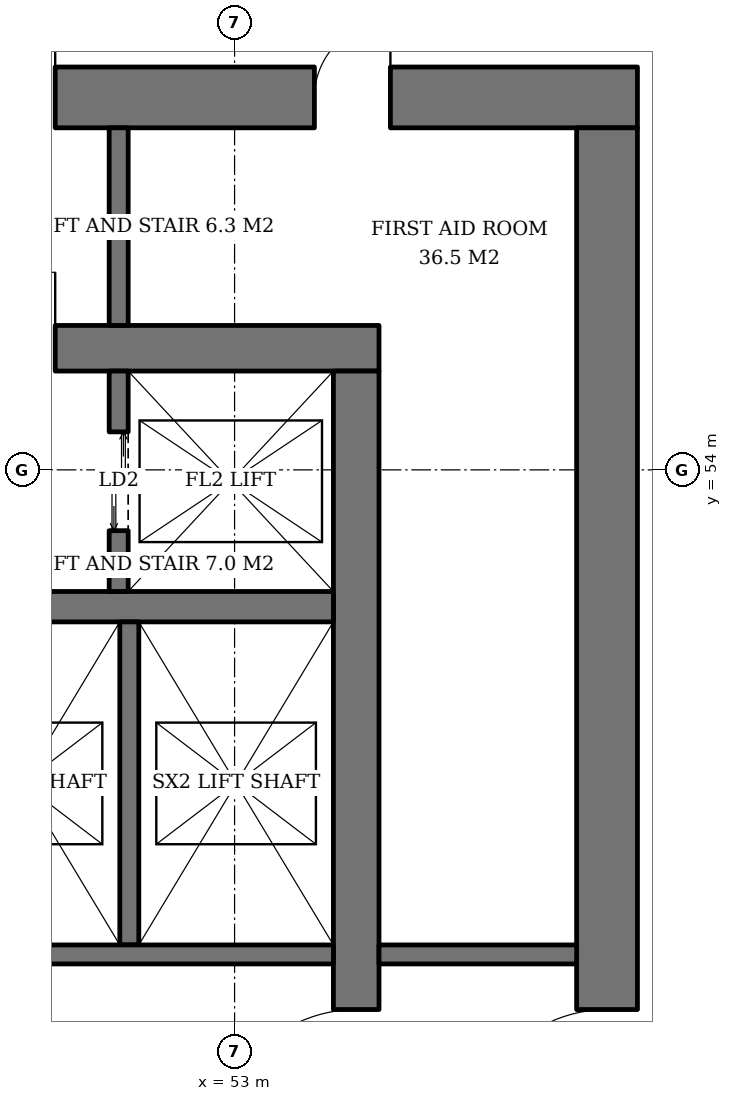
"""IFC4 building model, lengths in metres.
Left out: names, types, materials, properties, quantities, classifications, styles, units other than length and angle.
Written with IfcOpenShell. Run it as: python <this file> out.ifc"""

import sys

from ifc_helpers import new_model, si_unit, direction, frame, frame_2d, origin, place, context, subcontext, project, spatial, rectangle, extrude, element, fill, save


model = new_model("IFC4")
c1 = context("Model", 3, precision=1e-05, world=origin(), true_north=direction((0.0, 1.0)))
c2 = subcontext(c1, "Body", "Model", "MODEL_VIEW")
j1 = project(units=[si_unit("LENGTHUNIT", "METRE"), si_unit("PLANEANGLEUNIT", "RADIAN")], contexts=[c1])
p1 = place(None, origin())
s1 = spatial("IfcSite", under=j1, at=p1, CompositionType="ELEMENT")
p2 = place(p1, origin())
s2 = spatial("IfcBuilding", under=s1, at=p2, CompositionType="ELEMENT")
p3 = place(p2, frame((0.0, 0.0, 40.0)))
s3 = spatial("IfcBuildingStorey", under=s2, at=p3, CompositionType="ELEMENT", Elevation=40.0)
p4 = place(p3, frame((35.1, 55.6, 0.0), z_axis=(0.0, 0.0, 1.0), x_axis=(1.0, 0.0, 0.0)))
e1 = element("IfcWall", 1, at=p4, inside=s3, PredefinedType="SHEAR", context=c2, shape_type="SweptSolid", body=[
    extrude(rectangle(XDim=19.8, YDim=0.6, at=frame_2d((9.9, 0.0))), origin(), (0.0, 0.0, 1.0), 3.8),
])
p5 = place(p4, frame((14.54, 0.0, 0.0)))
e2 = element("IfcOpeningElement", 2, at=p5, cuts=e1, PredefinedType="OPENING", context=c2, shape_type="SweptSolid", body=[
    extrude(rectangle(XDim=1.0, YDim=2.1, at=frame_2d((0.5, 1.05))), frame((0.0, 0.31, 0.0), z_axis=(0.0, -1.0, 0.0), x_axis=(1.0, 0.0, 0.0)), (0.0, 0.0, 1.0), 0.62),
])
p6 = place(p4, frame((2.425, 0.0, 0.0)))
e3 = element("IfcOpeningElement", 3, at=p6, cuts=e1, PredefinedType="OPENING", context=c2, shape_type="SweptSolid", body=[
    extrude(rectangle(XDim=1.0, YDim=2.1, at=frame_2d((0.5, 1.05))), frame((0.0, 0.31, 0.0), z_axis=(0.0, -1.0, 0.0), x_axis=(1.0, 0.0, 0.0)), (0.0, 0.0, 1.0), 0.62),
])
p7 = place(p3, frame((54.6, 36.7, 0.0), z_axis=(0.0, 0.0, 1.0), x_axis=(0.0, 1.0, 0.0)))
e4 = element("IfcWall", 4, at=p7, inside=s3, PredefinedType="SHEAR", context=c2, shape_type="SweptSolid", body=[
    extrude(rectangle(XDim=18.6, YDim=0.6, at=frame_2d((9.3, 0.0))), origin(), (0.0, 0.0, 1.0), 3.8),
])
p8 = place(p7, frame((8.4, 0.0, 0.0)))
e5 = element("IfcOpeningElement", 5, at=p8, cuts=e4, PredefinedType="OPENING", context=c2, shape_type="SweptSolid", body=[
    extrude(rectangle(XDim=1.8, YDim=2.4, at=frame_2d((0.9, 1.2))), frame((0.0, 0.31, 0.0), z_axis=(0.0, -1.0, 0.0), x_axis=(1.0, 0.0, 0.0)), (0.0, 0.0, 1.0), 0.62),
])
p9 = place(p3, frame((31.7, 58.9, 0.0), z_axis=(0.0, 0.0, 1.0), x_axis=(1.0, 0.0, 0.0)))
e6 = element("IfcWall", 6, at=p9, inside=s3, PredefinedType="SHEAR", context=c2, shape_type="SweptSolid", body=[
    extrude(rectangle(XDim=26.6, YDim=0.8, at=frame_2d((13.3, 0.0))), origin(), (0.0, 0.0, 1.0), 3.8),
])
p10 = place(p9, frame((17.94, 0.0, 0.0)))
e7 = element("IfcOpeningElement", 7, at=p10, cuts=e6, PredefinedType="OPENING", context=c2, shape_type="SweptSolid", body=[
    extrude(rectangle(XDim=1.0, YDim=2.1, at=frame_2d((0.5, 1.05))), frame((0.0, 0.41, 0.0), z_axis=(0.0, -1.0, 0.0), x_axis=(1.0, 0.0, 0.0)), (0.0, 0.0, 1.0), 0.82),
])
p11 = place(p9, frame((5.825, 0.0, 0.0)))
e8 = element("IfcOpeningElement", 8, at=p11, cuts=e6, PredefinedType="OPENING", context=c2, shape_type="SweptSolid", body=[
    extrude(rectangle(XDim=1.0, YDim=2.1, at=frame_2d((0.5, 1.05))), frame((0.0, 0.41, 0.0), z_axis=(0.0, -1.0, 0.0), x_axis=(1.0, 0.0, 0.0)), (0.0, 0.0, 1.0), 0.82),
])
p12 = place(p9, frame((1.05, 0.0, 0.0)))
e9 = element("IfcOpeningElement", 9, at=p12, cuts=e6, PredefinedType="OPENING", context=c2, shape_type="SweptSolid", body=[
    extrude(rectangle(XDim=1.0, YDim=2.1, at=frame_2d((0.5, 1.05))), frame((0.0, 0.41, 0.0), z_axis=(0.0, -1.0, 0.0), x_axis=(1.0, 0.0, 0.0)), (0.0, 0.0, 1.0), 0.82),
])
p13 = place(p9, frame((2.637, 0.0, 0.0)))
e10 = element("IfcOpeningElement", 10, at=p13, cuts=e6, PredefinedType="OPENING", context=c2, shape_type="SweptSolid", body=[
    extrude(rectangle(XDim=1.0, YDim=2.1, at=frame_2d((0.5, 1.05))), frame((0.0, 0.41, 0.0), z_axis=(0.0, -1.0, 0.0), x_axis=(1.0, 0.0, 0.0)), (0.0, 0.0, 1.0), 0.82),
])
p14 = place(p9, frame((4.229, 0.0, 0.0)))
e11 = element("IfcOpeningElement", 11, at=p14, cuts=e6, PredefinedType="OPENING", context=c2, shape_type="SweptSolid", body=[
    extrude(rectangle(XDim=1.0, YDim=2.1, at=frame_2d((0.5, 1.05))), frame((0.0, 0.41, 0.0), z_axis=(0.0, -1.0, 0.0), x_axis=(1.0, 0.0, 0.0)), (0.0, 0.0, 1.0), 0.82),
])
p15 = place(p9, frame((9.126, 0.0, 0.0)))
e12 = element("IfcOpeningElement", 12, at=p15, cuts=e6, PredefinedType="OPENING", context=c2, shape_type="SweptSolid", body=[
    extrude(rectangle(XDim=1.0, YDim=2.1, at=frame_2d((0.5, 1.05))), frame((0.0, 0.41, 0.0), z_axis=(0.0, -1.0, 0.0), x_axis=(1.0, 0.0, 0.0)), (0.0, 0.0, 1.0), 0.82),
])
p16 = place(p9, frame((14.029, 0.0, 0.0)))
e13 = element("IfcOpeningElement", 13, at=p16, cuts=e6, PredefinedType="OPENING", context=c2, shape_type="SweptSolid", body=[
    extrude(rectangle(XDim=1.0, YDim=2.1, at=frame_2d((0.5, 1.05))), frame((0.0, 0.41, 0.0), z_axis=(0.0, -1.0, 0.0), x_axis=(1.0, 0.0, 0.0)), (0.0, 0.0, 1.0), 0.82),
])
p17 = place(p9, frame((22.35, 0.0, 0.0)))
e14 = element("IfcOpeningElement", 14, at=p17, cuts=e6, PredefinedType="OPENING", context=c2, shape_type="SweptSolid", body=[
    extrude(rectangle(XDim=1.0, YDim=2.1, at=frame_2d((0.5, 1.05))), frame((0.0, 0.41, 0.0), z_axis=(0.0, -1.0, 0.0), x_axis=(1.0, 0.0, 0.0)), (0.0, 0.0, 1.0), 0.82),
])
p18 = place(p3, frame((57.9, 33.5, 0.0), z_axis=(0.0, 0.0, 1.0), x_axis=(0.0, 1.0, 0.0)))
e15 = element("IfcWall", 15, at=p18, inside=s3, PredefinedType="SHEAR", context=c2, shape_type="SweptSolid", body=[
    extrude(rectangle(XDim=25.0, YDim=0.8, at=frame_2d((12.5, 0.0))), origin(), (0.0, 0.0, 1.0), 3.8),
])
p19 = place(p18, frame((11.6, 0.0, 0.0)))
e16 = element("IfcOpeningElement", 16, at=p19, cuts=e15, PredefinedType="OPENING", context=c2, shape_type="SweptSolid", body=[
    extrude(rectangle(XDim=1.8, YDim=2.4, at=frame_2d((0.9, 1.2))), frame((0.0, 0.41, 0.0), z_axis=(0.0, -1.0, 0.0), x_axis=(1.0, 0.0, 0.0)), (0.0, 0.0, 1.0), 0.82),
])
p20 = place(p3, frame((35.7, 52.2, 0.0), z_axis=(0.0, 0.0, 1.0), x_axis=(1.0, 0.0, 0.0)))
e17 = element("IfcWall", 17, at=p20, inside=s3, PredefinedType="SHEAR", context=c2, shape_type="SweptSolid", body=[
    extrude(rectangle(XDim=18.6, YDim=0.4, at=frame_2d((9.3, 0.0))), origin(), (0.0, 0.0, 1.0), 3.8),
])
p21 = place(p3, frame((51.475, 52.4, 0.0), z_axis=(0.0, 0.0, 1.0), x_axis=(0.0, 1.0, 0.0)))
e18 = element("IfcWall", 18, at=p21, inside=s3, PredefinedType="SHEAR", context=c2, shape_type="SweptSolid", body=[
    extrude(rectangle(XDim=2.9, YDim=0.25, at=frame_2d((1.45, 0.0))), origin(), (0.0, 0.0, 1.0), 3.8),
])
p22 = place(p21, frame((0.8, 0.0, 0.0)))
e19 = element("IfcOpeningElement", 19, at=p22, cuts=e18, PredefinedType="OPENING", context=c2, shape_type="SweptSolid", body=[
    extrude(rectangle(XDim=1.3, YDim=2.2, at=frame_2d((0.65, 1.1))), frame((0.0, 0.135, 0.0), z_axis=(0.0, -1.0, 0.0), x_axis=(1.0, 0.0, 0.0)), (0.0, 0.0, 1.0), 0.27),
])
p23 = place(p3, frame((51.615, 47.75, 0.0), z_axis=(0.0, 0.0, 1.0), x_axis=(0.0, 1.0, 0.0)))
e20 = element("IfcWall", 20, at=p23, inside=s3, PredefinedType="SHEAR", context=c2, shape_type="SweptSolid", body=[
    extrude(rectangle(XDim=4.25, YDim=0.25, at=frame_2d((2.125, 0.0))), origin(), (0.0, 0.0, 1.0), 3.8),
])
p24 = place(p3, frame((48.93, 47.625, 0.0), z_axis=(0.0, 0.0, 1.0), x_axis=(1.0, 0.0, 0.0)))
e21 = element("IfcWall", 21, at=p24, inside=s3, PredefinedType="SHEAR", context=c2, shape_type="SweptSolid", body=[
    extrude(rectangle(XDim=5.37, YDim=0.25, at=frame_2d((2.685, 0.0))), origin(), (0.0, 0.0, 1.0), 3.8),
])
for number, where, z_axis, x_axis in (
    (22, (51.475, 55.9, 0.0), (0.0, 0.0, 1.0), (0.0, 1.0, 0.0)),
    (23, (54.9, 47.625, 0.0), (0.0, 0.0, 1.0), (1.0, 0.0, 0.0)),
):
    element("IfcWall", number, at=place(p3, frame(where, z_axis=z_axis, x_axis=x_axis)), inside=s3, PredefinedType="SOLIDWALL", context=c2, shape_type="SweptSolid", body=[
        extrude(rectangle(XDim=2.6, YDim=0.25, at=frame_2d((1.3, 0.0))), origin(), (0.0, 0.0, 1.0), 3.62),
    ])
p25 = place(p22, origin())
e24 = element("IfcDoor", 24, at=p25, inside=s3, OperationType="DOUBLE_DOOR_SLIDING", PredefinedType="DOOR", context=c2, shape_type="SweptSolid", body=[
    extrude(rectangle(XDim=1.3, YDim=2.2, at=frame_2d((0.65, 1.1))), frame((0.0, 0.025, 0.0), z_axis=(0.0, -1.0, 0.0), x_axis=(1.0, 0.0, 0.0)), (0.0, 0.0, 1.0), 0.05),
])
fill(e19, e24)
p26 = place(p5, origin())
e25 = element("IfcDoor", 25, at=p26, inside=s3, OperationType="SINGLE_SWING_RIGHT", PredefinedType="DOOR", context=c2, shape_type="SweptSolid", body=[
    extrude(rectangle(XDim=1.0, YDim=2.1, at=frame_2d((0.5, 1.05))), frame((0.0, 0.025, 0.0), z_axis=(0.0, -1.0, 0.0), x_axis=(1.0, 0.0, 0.0)), (0.0, 0.0, 1.0), 0.05),
])
fill(e2, e25)
p27 = place(p8, origin())
e26 = element("IfcDoor", 26, at=p27, inside=s3, OperationType="DOUBLE_DOOR_SINGLE_SWING", PredefinedType="DOOR", context=c2, shape_type="SweptSolid", body=[
    extrude(rectangle(XDim=1.8, YDim=2.4, at=frame_2d((0.9, 1.2))), frame((0.0, 0.025, 0.0), z_axis=(0.0, -1.0, 0.0), x_axis=(1.0, 0.0, 0.0)), (0.0, 0.0, 1.0), 0.05),
])
fill(e5, e26)
p28 = place(p19, origin())
e27 = element("IfcDoor", 27, at=p28, inside=s3, OperationType="DOUBLE_DOOR_SINGLE_SWING", PredefinedType="DOOR", context=c2, shape_type="SweptSolid", body=[
    extrude(rectangle(XDim=1.8, YDim=2.4, at=frame_2d((0.9, 1.2))), frame((0.0, 0.025, 0.0), z_axis=(0.0, -1.0, 0.0), x_axis=(1.0, 0.0, 0.0)), (0.0, 0.0, 1.0), 0.05),
])
fill(e16, e27)
p29 = place(p10, origin())
e28 = element("IfcDoor", 28, at=p29, inside=s3, OperationType="SINGLE_SWING_RIGHT", PredefinedType="DOOR", context=c2, shape_type="SweptSolid", body=[
    extrude(rectangle(XDim=1.0, YDim=2.1, at=frame_2d((0.5, 1.05))), frame((0.0, 0.025, 0.0), z_axis=(0.0, -1.0, 0.0), x_axis=(1.0, 0.0, 0.0)), (0.0, 0.0, 1.0), 0.05),
])
fill(e7, e28)
p30 = place(p17, origin())
e29 = element("IfcDoor", 29, at=p30, inside=s3, OperationType="SINGLE_SWING_RIGHT", PredefinedType="DOOR", context=c2, shape_type="SweptSolid", body=[
    extrude(rectangle(XDim=1.0, YDim=2.1, at=frame_2d((0.5, 1.05))), frame((0.0, -0.34, 0.0), z_axis=(0.0, -1.0, 0.0), x_axis=(1.0, 0.0, 0.0)), (0.0, 0.0, 1.0), 0.05),
])
fill(e14, e29)
save(model, sys.argv[1])
